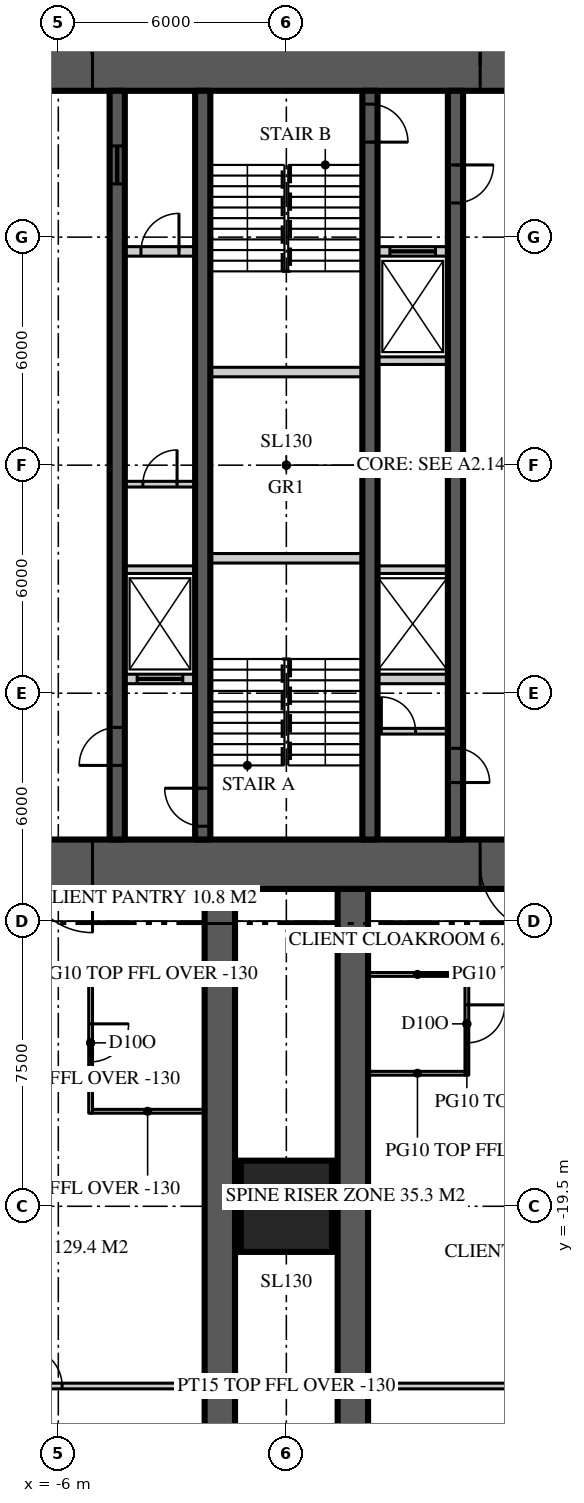
"""IFC4 building model, lengths in metres.
Left out: names, types, materials, properties, quantities, classifications, styles, units other than length and angle.
Written with IfcOpenShell. Run it as: python <this file> out.ifc"""

import sys

from ifc_helpers import new_model, si_unit, direction, frame, frame_2d, origin, origin_2d, place, context, subcontext, project, spatial, rectangle, extrude, element, fill, save


model = new_model("IFC4")
c1 = context("Model", 3, precision=1e-05, world=origin(), true_north=direction((0.0, 1.0)))
c2 = subcontext(c1, "Body", "Model", "MODEL_VIEW")
j1 = project(units=[si_unit("LENGTHUNIT", "METRE"), si_unit("PLANEANGLEUNIT", "RADIAN")], contexts=[c1])
p1 = place(None, origin())
s1 = spatial("IfcSite", under=j1, at=p1, CompositionType="ELEMENT")
p2 = place(p1, origin())
s2 = spatial("IfcBuilding", under=s1, at=p2, CompositionType="ELEMENT")
p3 = place(p2, frame((0.0, 0.0, 94.2)))
s3 = spatial("IfcBuildingStorey", under=s2, at=p3, CompositionType="ELEMENT", Elevation=94.2)
p4 = place(p3, frame((-11.15, 10.5, 0.0), z_axis=(0.0, 0.0, 1.0), x_axis=(1.0, 0.0, 0.0)))
e1 = element("IfcWall", 1, at=p4, inside=s3, PredefinedType="SHEAR", context=c2, shape_type="SweptSolid", body=[
    extrude(rectangle(XDim=22.3, YDim=1.3, at=frame_2d((11.15, 0.0))), origin(), (0.0, 0.0, 1.0), 3.9),
])
p5 = place(p4, frame((4.25, 0.0, 0.0)))
e2 = element("IfcOpeningElement", 2, at=p5, cuts=e1, PredefinedType="OPENING", context=c2, shape_type="SweptSolid", body=[
    extrude(rectangle(XDim=1.8, YDim=2.2, at=frame_2d((0.9, 1.1))), frame((0.0, 0.66, 0.0), z_axis=(0.0, -1.0, 0.0), x_axis=(1.0, 0.0, 0.0)), (0.0, 0.0, 1.0), 1.32),
])
p6 = place(p4, frame((16.25, 0.0, 0.0)))
e3 = element("IfcOpeningElement", 3, at=p6, cuts=e1, PredefinedType="OPENING", context=c2, shape_type="SweptSolid", body=[
    extrude(rectangle(XDim=1.8, YDim=2.2, at=frame_2d((0.9, 1.1))), frame((0.0, 0.66, 0.0), z_axis=(0.0, -1.0, 0.0), x_axis=(1.0, 0.0, 0.0)), (0.0, 0.0, 1.0), 1.32),
])
p7 = place(p3, frame((11.15, -10.5, 0.0), z_axis=(0.0, 0.0, 1.0), x_axis=(-1.0, 0.0, 0.0)))
e4 = element("IfcWall", 4, at=p7, inside=s3, PredefinedType="SHEAR", context=c2, shape_type="SweptSolid", body=[
    extrude(rectangle(XDim=22.3, YDim=1.3, at=frame_2d((11.15, 0.0))), origin(), (0.0, 0.0, 1.0), 3.9),
])
p8 = place(p7, frame((16.25, 0.0, 0.0)))
e5 = element("IfcOpeningElement", 5, at=p8, cuts=e4, PredefinedType="OPENING", context=c2, shape_type="SweptSolid", body=[
    extrude(rectangle(XDim=1.8, YDim=2.2, at=frame_2d((0.9, 1.1))), frame((0.0, 0.66, 0.0), z_axis=(0.0, -1.0, 0.0), x_axis=(1.0, 0.0, 0.0)), (0.0, 0.0, 1.0), 1.32),
])
p9 = place(p7, frame((4.25, 0.0, 0.0)))
e6 = element("IfcOpeningElement", 6, at=p9, cuts=e4, PredefinedType="OPENING", context=c2, shape_type="SweptSolid", body=[
    extrude(rectangle(XDim=1.8, YDim=2.2, at=frame_2d((0.9, 1.1))), frame((0.0, 0.66, 0.0), z_axis=(0.0, -1.0, 0.0), x_axis=(1.0, 0.0, 0.0)), (0.0, 0.0, 1.0), 1.32),
])
for number, where, z_axis, x_axis in (
    (7, (-1.75, -11.15, 0.0), (0.0, 0.0, 1.0), (0.0, -1.0, 0.0)),
    (8, (1.75, -11.15, 0.0), (0.0, 0.0, 1.0), (0.0, -1.0, 0.0)),
):
    element("IfcWall", number, at=place(p3, frame(where, z_axis=z_axis, x_axis=x_axis)), inside=s3, PredefinedType="SHEAR", context=c2, shape_type="SweptSolid", body=[
        extrude(rectangle(XDim=15.25, YDim=0.8, at=frame_2d((7.625, 0.0))), origin(), (0.0, 0.0, 1.0), 3.9),
    ])
p10 = place(p3, frame((0.0, -19.5, 0.0), z_axis=(0.0, 0.0, 1.0), x_axis=(1.0, 0.0, 0.0)))
e9 = element("IfcColumn", 9, at=p10, inside=s3, PredefinedType="COLUMN", context=c2, shape_type="SweptSolid", body=[
    extrude(rectangle(XDim=2.4, YDim=2.4, at=origin_2d()), origin(), (0.0, 0.0, 1.0), 3.9),
])
p11 = place(p3, frame((-4.45, -9.85, 0.0), z_axis=(0.0, 0.0, 1.0), x_axis=(0.0, 1.0, 0.0)))
e10 = element("IfcWall", 10, at=p11, inside=s3, PredefinedType="SHEAR", context=c2, shape_type="SweptSolid", body=[
    extrude(rectangle(XDim=19.7, YDim=0.4, at=frame_2d((9.85, 0.0))), origin(), (0.0, 0.0, 1.0), 3.9),
])
p12 = place(p11, frame((1.95, 0.0, 0.0)))
e11 = element("IfcOpeningElement", 11, at=p12, cuts=e10, PredefinedType="OPENING", context=c2, shape_type="SweptSolid", body=[
    extrude(rectangle(XDim=1.0, YDim=2.2, at=frame_2d((0.5, 1.1))), frame((0.0, 0.21, 0.0), z_axis=(0.0, -1.0, 0.0), x_axis=(1.0, 0.0, 0.0)), (0.0, 0.0, 1.0), 0.42),
])
p13 = place(p11, frame((17.25, 0.0, 0.0)))
e12 = element("IfcOpeningElement", 12, at=p13, cuts=e10, PredefinedType="OPENING", context=c2, shape_type="SweptSolid", body=[
    extrude(rectangle(XDim=1.0, YDim=2.1, at=frame_2d((0.5, 1.05))), frame((0.0, 0.21, 0.0), z_axis=(0.0, -1.0, 0.0), x_axis=(1.0, 0.0, 0.0)), (0.0, 0.0, 1.0), 0.42),
])
p14 = place(p3, frame((4.45, 9.85, 0.0), z_axis=(0.0, 0.0, 1.0), x_axis=(0.0, -1.0, 0.0)))
e13 = element("IfcWall", 13, at=p14, inside=s3, PredefinedType="SHEAR", context=c2, shape_type="SweptSolid", body=[
    extrude(rectangle(XDim=19.7, YDim=0.4, at=frame_2d((9.85, 0.0))), origin(), (0.0, 0.0, 1.0), 3.9),
])
p15 = place(p14, frame((1.95, 0.0, 0.0)))
e14 = element("IfcOpeningElement", 14, at=p15, cuts=e13, PredefinedType="OPENING", context=c2, shape_type="SweptSolid", body=[
    extrude(rectangle(XDim=1.0, YDim=2.2, at=frame_2d((0.5, 1.1))), frame((0.0, 0.21, 0.0), z_axis=(0.0, -1.0, 0.0), x_axis=(1.0, 0.0, 0.0)), (0.0, 0.0, 1.0), 0.42),
])
p16 = place(p14, frame((17.3, 0.0, 0.0)))
e15 = element("IfcOpeningElement", 15, at=p16, cuts=e13, PredefinedType="OPENING", context=c2, shape_type="SweptSolid", body=[
    extrude(rectangle(XDim=0.9, YDim=2.1, at=frame_2d((0.45, 1.05))), frame((0.0, 0.21, 0.0), z_axis=(0.0, -1.0, 0.0), x_axis=(1.0, 0.0, 0.0)), (0.0, 0.0, 1.0), 0.42),
])
p17 = place(p3, frame((-2.2, -9.85, 0.0), z_axis=(0.0, 0.0, 1.0), x_axis=(0.0, 1.0, 0.0)))
e16 = element("IfcWall", 16, at=p17, inside=s3, PredefinedType="SHEAR", context=c2, shape_type="SweptSolid", body=[
    extrude(rectangle(XDim=19.7, YDim=0.4, at=frame_2d((9.85, 0.0))), origin(), (0.0, 0.0, 1.0), 3.9),
])
p18 = place(p17, frame((0.35, 0.0, 0.0)))
e17 = element("IfcOpeningElement", 17, at=p18, cuts=e16, PredefinedType="OPENING", context=c2, shape_type="SweptSolid", body=[
    extrude(rectangle(XDim=1.0, YDim=2.2, at=frame_2d((0.5, 1.1))), frame((0.0, 0.21, 0.0), z_axis=(0.0, -1.0, 0.0), x_axis=(1.0, 0.0, 0.0)), (0.0, 0.0, 1.0), 0.42),
])
p19 = place(p3, frame((2.2, 9.85, 0.0), z_axis=(0.0, 0.0, 1.0), x_axis=(0.0, -1.0, 0.0)))
e18 = element("IfcWall", 18, at=p19, inside=s3, PredefinedType="SHEAR", context=c2, shape_type="SweptSolid", body=[
    extrude(rectangle(XDim=19.7, YDim=0.4, at=frame_2d((9.85, 0.0))), origin(), (0.0, 0.0, 1.0), 3.9),
])
p20 = place(p19, frame((0.35, 0.0, 0.0)))
e19 = element("IfcOpeningElement", 19, at=p20, cuts=e18, PredefinedType="OPENING", context=c2, shape_type="SweptSolid", body=[
    extrude(rectangle(XDim=1.0, YDim=2.2, at=frame_2d((0.5, 1.1))), frame((0.0, 0.21, 0.0), z_axis=(0.0, -1.0, 0.0), x_axis=(1.0, 0.0, 0.0)), (0.0, 0.0, 1.0), 0.42),
])
p21 = place(p3, frame((-4.25, 5.625, 0.0), z_axis=(0.0, 0.0, 1.0), x_axis=(1.0, 0.0, 0.0)))
e20 = element("IfcWall", 20, at=p21, inside=s3, PredefinedType="SOLIDWALL", context=c2, shape_type="SweptSolid", body=[
    extrude(rectangle(XDim=1.85, YDim=0.25, at=frame_2d((0.925, 0.0))), origin(), (0.0, 0.0, 1.0), 3.7),
])
p22 = place(p21, frame((0.425, 0.0, 0.0)))
e21 = element("IfcOpeningElement", 21, at=p22, cuts=e20, PredefinedType="OPENING", context=c2, shape_type="SweptSolid", body=[
    extrude(rectangle(XDim=1.0, YDim=2.2, at=frame_2d((0.5, 1.1))), frame((0.0, 0.135, 0.0), z_axis=(0.0, -1.0, 0.0), x_axis=(1.0, 0.0, 0.0)), (0.0, 0.0, 1.0), 0.27),
])
p23 = place(p3, frame((2.4, 5.625, 0.0), z_axis=(0.0, 0.0, 1.0), x_axis=(1.0, 0.0, 0.0)))
e22 = element("IfcWall", 22, at=p23, inside=s3, PredefinedType="SOLIDWALL", context=c2, shape_type="SweptSolid", body=[
    extrude(rectangle(XDim=1.85, YDim=0.25, at=frame_2d((0.925, 0.0))), origin(), (0.0, 0.0, 1.0), 3.7),
])
p24 = place(p23, frame((0.325, 0.0, 0.0)))
e23 = element("IfcOpeningElement", 23, at=p24, cuts=e22, PredefinedType="OPENING", context=c2, shape_type="SweptSolid", body=[
    extrude(rectangle(XDim=1.2, YDim=2.2, at=frame_2d((0.6, 1.1))), frame((0.0, 0.135, 0.0), z_axis=(0.0, -1.0, 0.0), x_axis=(1.0, 0.0, 0.0)), (0.0, 0.0, 1.0), 0.27),
])
p25 = place(p3, frame((-4.25, -5.625, 0.0), z_axis=(0.0, 0.0, 1.0), x_axis=(1.0, 0.0, 0.0)))
e24 = element("IfcWall", 24, at=p25, inside=s3, PredefinedType="SOLIDWALL", context=c2, shape_type="SweptSolid", body=[
    extrude(rectangle(XDim=1.85, YDim=0.25, at=frame_2d((0.925, 0.0))), origin(), (0.0, 0.0, 1.0), 3.7),
])
p26 = place(p25, frame((0.325, 0.0, 0.0)))
e25 = element("IfcOpeningElement", 25, at=p26, cuts=e24, PredefinedType="OPENING", context=c2, shape_type="SweptSolid", body=[
    extrude(rectangle(XDim=1.2, YDim=2.2, at=frame_2d((0.6, 1.1))), frame((0.0, 0.135, 0.0), z_axis=(0.0, -1.0, 0.0), x_axis=(1.0, 0.0, 0.0)), (0.0, 0.0, 1.0), 0.27),
])
p27 = place(p3, frame((2.4, -5.625, 0.0), z_axis=(0.0, 0.0, 1.0), x_axis=(1.0, 0.0, 0.0)))
e26 = element("IfcWall", 26, at=p27, inside=s3, PredefinedType="SOLIDWALL", context=c2, shape_type="SweptSolid", body=[
    extrude(rectangle(XDim=1.85, YDim=0.25, at=frame_2d((0.925, 0.0))), origin(), (0.0, 0.0, 1.0), 3.7),
])
for number, where, z_axis, x_axis in (
    (27, (-2.0, -2.45, 0.0), (0.0, 0.0, 1.0), (1.0, 0.0, 0.0)),
    (28, (-2.0, 2.45, 0.0), (0.0, 0.0, 1.0), (1.0, 0.0, 0.0)),
):
    element("IfcWall", number, at=place(p3, frame(where, z_axis=z_axis, x_axis=x_axis)), inside=s3, PredefinedType="SOLIDWALL", context=c2, shape_type="SweptSolid", body=[
        extrude(rectangle(XDim=4.0, YDim=0.25, at=frame_2d((2.0, 0.0))), origin(), (0.0, 0.0, 1.0), 3.7),
    ])
for number, where, z_axis, x_axis in (
    (29, (-4.25, -2.75, 0.0), (0.0, 0.0, 1.0), (1.0, 0.0, 0.0)),
    (30, (2.4, -2.75, 0.0), (0.0, 0.0, 1.0), (1.0, 0.0, 0.0)),
    (31, (2.4, 2.75, 0.0), (0.0, 0.0, 1.0), (1.0, 0.0, 0.0)),
):
    element("IfcWall", number, at=place(p3, frame(where, z_axis=z_axis, x_axis=x_axis)), inside=s3, PredefinedType="SOLIDWALL", context=c2, shape_type="SweptSolid", body=[
        extrude(rectangle(XDim=1.85, YDim=0.2, at=frame_2d((0.925, 0.0))), origin(), (0.0, 0.0, 1.0), 3.7),
    ])
p28 = place(p3, frame((-12.82, -24.229, 0.0), z_axis=(0.0, 0.0, 1.0), x_axis=(1.0, 0.0, 0.0)))
e32 = element("IfcWall", 32, at=p28, inside=s3, PredefinedType="PARTITIONING", context=c2, shape_type="SweptSolid", body=[
    extrude(rectangle(XDim=25.64, YDim=0.15, at=frame_2d((12.82, 0.0))), origin(), (0.0, 0.0, 1.0), 3.77),
])
p29 = place(p28, frame((18.72, 0.0, 0.0)))
e33 = element("IfcOpeningElement", 33, at=p29, cuts=e32, PredefinedType="OPENING", context=c2, shape_type="SweptSolid", body=[
    extrude(rectangle(XDim=1.0, YDim=2.2, at=frame_2d((0.5, 1.1))), frame((0.0, 0.085, 0.0), z_axis=(0.0, -1.0, 0.0), x_axis=(1.0, 0.0, 0.0)), (0.0, 0.0, 1.0), 0.17),
])
p30 = place(p28, frame((5.92, 0.0, 0.0)))
e34 = element("IfcOpeningElement", 34, at=p30, cuts=e32, PredefinedType="OPENING", context=c2, shape_type="SweptSolid", body=[
    extrude(rectangle(XDim=1.0, YDim=2.2, at=frame_2d((0.5, 1.1))), frame((0.0, 0.085, 0.0), z_axis=(0.0, -1.0, 0.0), x_axis=(1.0, 0.0, 0.0)), (0.0, 0.0, 1.0), 0.17),
])
for number, where, z_axis, x_axis in (
    (35, (2.15, -13.4, 0.0), (0.0, 0.0, 1.0), (1.0, 0.0, 0.0)),
    (36, (2.15, -16.0, 0.0), (0.0, 0.0, 1.0), (1.0, 0.0, 0.0)),
):
    element("IfcWall", number, at=place(p3, frame(where, z_axis=z_axis, x_axis=x_axis)), inside=s3, PredefinedType="PARTITIONING", context=c2, shape_type="SweptSolid", body=[
        extrude(rectangle(XDim=2.6, YDim=0.1, at=frame_2d((1.3, 0.0))), origin(), (0.0, 0.0, 1.0), 3.77),
    ])
p31 = place(p3, frame((4.75, -13.35, 0.0), z_axis=(0.0, 0.0, 1.0), x_axis=(0.0, -1.0, 0.0)))
e37 = element("IfcWall", 37, at=p31, inside=s3, PredefinedType="PARTITIONING", context=c2, shape_type="SweptSolid", body=[
    extrude(rectangle(XDim=2.7, YDim=0.1, at=frame_2d((1.35, 0.0))), origin(), (0.0, 0.0, 1.0), 3.77),
])
p32 = place(p31, frame((0.85, 0.0, 0.0)))
e38 = element("IfcOpeningElement", 38, at=p32, cuts=e37, PredefinedType="OPENING", context=c2, shape_type="SweptSolid", body=[
    extrude(rectangle(XDim=1.0, YDim=2.2, at=frame_2d((0.5, 1.1))), frame((0.0, 0.06, 0.0), z_axis=(0.0, -1.0, 0.0), x_axis=(1.0, 0.0, 0.0)), (0.0, 0.0, 1.0), 0.12),
])
for number, where, z_axis, x_axis in (
    (39, (-2.15, -13.4, 0.0), (0.0, 0.0, 1.0), (-1.0, 0.0, 0.0)),
    (40, (-2.15, -17.0, 0.0), (0.0, 0.0, 1.0), (-1.0, 0.0, 0.0)),
):
    element("IfcWall", number, at=place(p3, frame(where, z_axis=z_axis, x_axis=x_axis)), inside=s3, PredefinedType="PARTITIONING", context=c2, shape_type="SweptSolid", body=[
        extrude(rectangle(XDim=3.0, YDim=0.1, at=frame_2d((1.5, 0.0))), origin(), (0.0, 0.0, 1.0), 3.77),
    ])
p33 = place(p3, frame((-5.15, -13.35, 0.0), z_axis=(0.0, 0.0, 1.0), x_axis=(0.0, -1.0, 0.0)))
e41 = element("IfcWall", 41, at=p33, inside=s3, PredefinedType="PARTITIONING", context=c2, shape_type="SweptSolid", body=[
    extrude(rectangle(XDim=3.7, YDim=0.1, at=frame_2d((1.85, 0.0))), origin(), (0.0, 0.0, 1.0), 3.77),
])
p34 = place(p33, frame((1.35, 0.0, 0.0)))
e42 = element("IfcOpeningElement", 42, at=p34, cuts=e41, PredefinedType="OPENING", context=c2, shape_type="SweptSolid", body=[
    extrude(rectangle(XDim=1.0, YDim=2.2, at=frame_2d((0.5, 1.1))), frame((0.0, 0.06, 0.0), z_axis=(0.0, -1.0, 0.0), x_axis=(1.0, 0.0, 0.0)), (0.0, 0.0, 1.0), 0.12),
])
p35 = place(p3, frame((-4.25, -0.5, 0.0), z_axis=(0.0, 0.0, 1.0), x_axis=(1.0, 0.0, 0.0)))
e43 = element("IfcWall", 43, at=p35, inside=s3, PredefinedType="SOLIDWALL", context=c2, shape_type="SweptSolid", body=[
    extrude(rectangle(XDim=1.85, YDim=0.15, at=frame_2d((0.925, 0.0))), origin(), (0.0, 0.0, 1.0), 3.77),
])
p36 = place(p35, frame((0.475, 0.0, 0.0)))
e44 = element("IfcOpeningElement", 44, at=p36, cuts=e43, PredefinedType="OPENING", context=c2, shape_type="SweptSolid", body=[
    extrude(rectangle(XDim=0.9, YDim=2.1, at=frame_2d((0.45, 1.05))), frame((0.0, 0.085, 0.0), z_axis=(0.0, -1.0, 0.0), x_axis=(1.0, 0.0, 0.0)), (0.0, 0.0, 1.0), 0.17),
])
p37 = place(p3, frame((2.4, -7.0, 0.0), z_axis=(0.0, 0.0, 1.0), x_axis=(1.0, 0.0, 0.0)))
e45 = element("IfcWall", 45, at=p37, inside=s3, PredefinedType="SOLIDWALL", context=c2, shape_type="SweptSolid", body=[
    extrude(rectangle(XDim=1.85, YDim=0.15, at=frame_2d((0.925, 0.0))), origin(), (0.0, 0.0, 1.0), 3.77),
])
p38 = place(p37, frame((0.1, 0.0, 0.0)))
e46 = element("IfcOpeningElement", 46, at=p38, cuts=e45, PredefinedType="OPENING", context=c2, shape_type="SweptSolid", body=[
    extrude(rectangle(XDim=0.9, YDim=2.1, at=frame_2d((0.45, 1.05))), frame((0.0, 0.085, 0.0), z_axis=(0.0, -1.0, 0.0), x_axis=(1.0, 0.0, 0.0)), (0.0, 0.0, 1.0), 0.17),
])
p39 = place(p5, origin())
e47 = element("IfcDoor", 47, at=p39, inside=s3, OperationType="DOUBLE_DOOR_DOUBLE_SWING", PredefinedType="DOOR", context=c2, shape_type="SweptSolid", body=[
    extrude(rectangle(XDim=1.8, YDim=2.2, at=frame_2d((0.9, 1.1))), frame((0.0, 0.025, 0.0), z_axis=(0.0, -1.0, 0.0), x_axis=(1.0, 0.0, 0.0)), (0.0, 0.0, 1.0), 0.05),
])
fill(e2, e47)
p40 = place(p8, origin())
e48 = element("IfcDoor", 48, at=p40, inside=s3, OperationType="DOUBLE_DOOR_DOUBLE_SWING", PredefinedType="DOOR", context=c2, shape_type="SweptSolid", body=[
    extrude(rectangle(XDim=1.8, YDim=2.2, at=frame_2d((0.9, 1.1))), frame((0.0, 0.025, 0.0), z_axis=(0.0, -1.0, 0.0), x_axis=(1.0, 0.0, 0.0)), (0.0, 0.0, 1.0), 0.05),
])
fill(e5, e48)
p41 = place(p6, origin())
e49 = element("IfcDoor", 49, at=p41, inside=s3, OperationType="DOUBLE_DOOR_DOUBLE_SWING", PredefinedType="DOOR", context=c2, shape_type="SweptSolid", body=[
    extrude(rectangle(XDim=1.8, YDim=2.2, at=frame_2d((0.9, 1.1))), frame((0.0, 0.025, 0.0), z_axis=(0.0, -1.0, 0.0), x_axis=(1.0, 0.0, 0.0)), (0.0, 0.0, 1.0), 0.05),
])
fill(e3, e49)
p42 = place(p9, origin())
e50 = element("IfcDoor", 50, at=p42, inside=s3, OperationType="DOUBLE_DOOR_DOUBLE_SWING", PredefinedType="DOOR", context=c2, shape_type="SweptSolid", body=[
    extrude(rectangle(XDim=1.8, YDim=2.2, at=frame_2d((0.9, 1.1))), frame((0.0, 0.025, 0.0), z_axis=(0.0, -1.0, 0.0), x_axis=(1.0, 0.0, 0.0)), (0.0, 0.0, 1.0), 0.05),
])
fill(e6, e50)
p43 = place(p12, origin())
e51 = element("IfcDoor", 51, at=p43, inside=s3, OperationType="SINGLE_SWING_LEFT", PredefinedType="DOOR", context=c2, shape_type="SweptSolid", body=[
    extrude(rectangle(XDim=1.0, YDim=2.2, at=frame_2d((0.5, 1.1))), frame((0.0, 0.025, 0.0), z_axis=(0.0, -1.0, 0.0), x_axis=(1.0, 0.0, 0.0)), (0.0, 0.0, 1.0), 0.05),
])
fill(e11, e51)
p44 = place(p18, origin())
e52 = element("IfcDoor", 52, at=p44, inside=s3, OperationType="SINGLE_SWING_RIGHT", PredefinedType="DOOR", context=c2, shape_type="SweptSolid", body=[
    extrude(rectangle(XDim=1.0, YDim=2.2, at=frame_2d((0.5, 1.1))), frame((0.0, 0.025, 0.0), z_axis=(0.0, -1.0, 0.0), x_axis=(1.0, 0.0, 0.0)), (0.0, 0.0, 1.0), 0.05),
])
fill(e17, e52)
p45 = place(p15, origin())
e53 = element("IfcDoor", 53, at=p45, inside=s3, OperationType="SINGLE_SWING_LEFT", PredefinedType="DOOR", context=c2, shape_type="SweptSolid", body=[
    extrude(rectangle(XDim=1.0, YDim=2.2, at=frame_2d((0.5, 1.1))), frame((0.0, 0.025, 0.0), z_axis=(0.0, -1.0, 0.0), x_axis=(1.0, 0.0, 0.0)), (0.0, 0.0, 1.0), 0.05),
])
fill(e14, e53)
p46 = place(p20, origin())
e54 = element("IfcDoor", 54, at=p46, inside=s3, OperationType="SINGLE_SWING_RIGHT", PredefinedType="DOOR", context=c2, shape_type="SweptSolid", body=[
    extrude(rectangle(XDim=1.0, YDim=2.2, at=frame_2d((0.5, 1.1))), frame((0.0, 0.025, 0.0), z_axis=(0.0, -1.0, 0.0), x_axis=(1.0, 0.0, 0.0)), (0.0, 0.0, 1.0), 0.05),
])
fill(e19, e54)
p47 = place(p13, origin())
e55 = element("IfcDoor", 55, at=p47, inside=s3, OperationType="SLIDING_TO_LEFT", PredefinedType="DOOR", context=c2, shape_type="SweptSolid", body=[
    extrude(rectangle(XDim=1.0, YDim=2.1, at=frame_2d((0.5, 1.05))), frame((0.0, 0.025, 0.0), z_axis=(0.0, -1.0, 0.0), x_axis=(1.0, 0.0, 0.0)), (0.0, 0.0, 1.0), 0.05),
])
fill(e12, e55)
p48 = place(p16, origin())
e56 = element("IfcDoor", 56, at=p48, inside=s3, OperationType="SINGLE_SWING_RIGHT", PredefinedType="DOOR", context=c2, shape_type="SweptSolid", body=[
    extrude(rectangle(XDim=0.9, YDim=2.1, at=frame_2d((0.45, 1.05))), frame((0.0, 0.025, 0.0), z_axis=(0.0, -1.0, 0.0), x_axis=(1.0, 0.0, 0.0)), (0.0, 0.0, 1.0), 0.05),
])
fill(e15, e56)
p49 = place(p26, origin())
e57 = element("IfcDoor", 57, at=p49, inside=s3, OperationType="SLIDING_TO_LEFT", PredefinedType="DOOR", context=c2, shape_type="SweptSolid", body=[
    extrude(rectangle(XDim=1.2, YDim=2.2, at=frame_2d((0.6, 1.1))), frame((0.0, 0.025, 0.0), z_axis=(0.0, -1.0, 0.0), x_axis=(1.0, 0.0, 0.0)), (0.0, 0.0, 1.0), 0.05),
])
fill(e25, e57)
p50 = place(p24, origin())
e58 = element("IfcDoor", 58, at=p50, inside=s3, OperationType="SLIDING_TO_LEFT", PredefinedType="DOOR", context=c2, shape_type="SweptSolid", body=[
    extrude(rectangle(XDim=1.2, YDim=2.2, at=frame_2d((0.6, 1.1))), frame((0.0, 0.025, 0.0), z_axis=(0.0, -1.0, 0.0), x_axis=(1.0, 0.0, 0.0)), (0.0, 0.0, 1.0), 0.05),
])
fill(e23, e58)
p51 = place(p30, origin())
e59 = element("IfcDoor", 59, at=p51, inside=s3, OperationType="SINGLE_SWING_LEFT", PredefinedType="DOOR", context=c2, shape_type="SweptSolid", body=[
    extrude(rectangle(XDim=1.0, YDim=2.2, at=frame_2d((0.5, 1.1))), frame((0.0, 0.025, 0.0), z_axis=(0.0, -1.0, 0.0), x_axis=(1.0, 0.0, 0.0)), (0.0, 0.0, 1.0), 0.05),
])
fill(e34, e59)
p52 = place(p32, origin())
e60 = element("IfcDoor", 60, at=p52, inside=s3, OperationType="SINGLE_SWING_LEFT", PredefinedType="DOOR", context=c2, shape_type="SweptSolid", body=[
    extrude(rectangle(XDim=1.0, YDim=2.2, at=frame_2d((0.5, 1.1))), frame((0.0, 0.025, 0.0), z_axis=(0.0, -1.0, 0.0), x_axis=(1.0, 0.0, 0.0)), (0.0, 0.0, 1.0), 0.05),
])
fill(e38, e60)
p53 = place(p34, origin())
e61 = element("IfcDoor", 61, at=p53, inside=s3, OperationType="SINGLE_SWING_LEFT", PredefinedType="DOOR", context=c2, shape_type="SweptSolid", body=[
    extrude(rectangle(XDim=1.0, YDim=2.2, at=frame_2d((0.5, 1.1))), frame((0.0, 0.025, 0.0), z_axis=(0.0, -1.0, 0.0), x_axis=(1.0, 0.0, 0.0)), (0.0, 0.0, 1.0), 0.05),
])
fill(e42, e61)
p54 = place(p36, origin())
e62 = element("IfcDoor", 62, at=p54, inside=s3, OperationType="SINGLE_SWING_RIGHT", PredefinedType="DOOR", context=c2, shape_type="SweptSolid", body=[
    extrude(rectangle(XDim=0.9, YDim=2.1, at=frame_2d((0.45, 1.05))), frame((0.0, 0.025, 0.0), z_axis=(0.0, -1.0, 0.0), x_axis=(1.0, 0.0, 0.0)), (0.0, 0.0, 1.0), 0.05),
])
fill(e44, e62)
p55 = place(p22, origin())
e63 = element("IfcDoor", 63, at=p55, inside=s3, OperationType="SINGLE_SWING_RIGHT", PredefinedType="DOOR", context=c2, shape_type="SweptSolid", body=[
    extrude(rectangle(XDim=1.0, YDim=2.2, at=frame_2d((0.5, 1.1))), frame((0.0, 0.025, 0.0), z_axis=(0.0, -1.0, 0.0), x_axis=(1.0, 0.0, 0.0)), (0.0, 0.0, 1.0), 0.05),
])
fill(e21, e63)
p56 = place(p38, origin())
e64 = element("IfcDoor", 64, at=p56, inside=s3, OperationType="SINGLE_SWING_LEFT", PredefinedType="DOOR", context=c2, shape_type="SweptSolid", body=[
    extrude(rectangle(XDim=0.9, YDim=2.1, at=frame_2d((0.45, 1.05))), frame((0.0, 0.025, 0.0), z_axis=(0.0, -1.0, 0.0), x_axis=(1.0, 0.0, 0.0)), (0.0, 0.0, 1.0), 0.05),
])
fill(e46, e64)
save(model, sys.argv[1])
